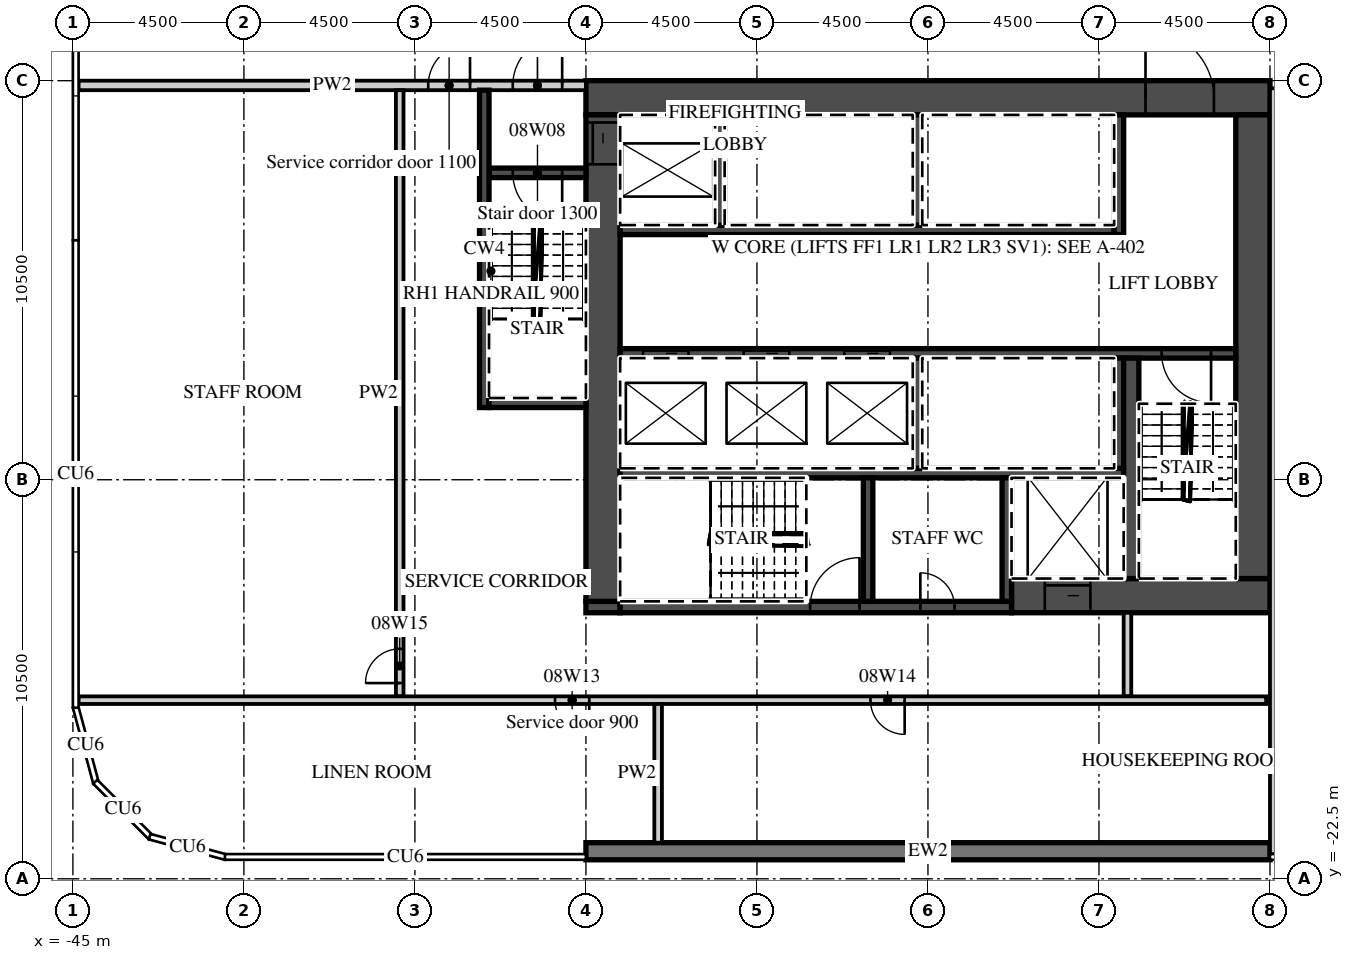
"""IFC4 building model, lengths in metres.
Left out: names, types, materials, properties, quantities, classifications, styles, units other than length and angle.
Written with IfcOpenShell. Run it as: python <this file> out.ifc"""

import sys

from ifc_helpers import new_model, si_unit, direction, frame, frame_2d, origin, place, context, subcontext, project, spatial, rectangle, extrude, element, fill, save


model = new_model("IFC4")
c1 = context("Model", 3, precision=1e-05, world=origin(), true_north=direction((0.0, 1.0)))
c2 = subcontext(c1, "Body", "Model", "MODEL_VIEW")
j1 = project(units=[si_unit("LENGTHUNIT", "METRE"), si_unit("PLANEANGLEUNIT", "RADIAN")], contexts=[c1])
p1 = place(None, origin())
s1 = spatial("IfcSite", under=j1, at=p1, CompositionType="ELEMENT")
p2 = place(p1, origin())
s2 = spatial("IfcBuilding", under=s1, at=p2, CompositionType="ELEMENT")
p3 = place(p2, frame((0.0, 0.0, 53.0)))
s3 = spatial("IfcBuildingStorey", under=s2, at=p3, CompositionType="ELEMENT", Elevation=53.0)
p4 = place(p3, frame((-31.5, -21.775, 0.0), z_axis=(0.0, 0.0, 1.0), x_axis=(1.0, 0.0, 0.0)))
e1 = element("IfcWall", 1, at=p4, inside=s3, PredefinedType="SOLIDWALL", context=c2, shape_type="SweptSolid", body=[
    extrude(rectangle(XDim=18.0, YDim=0.45, at=frame_2d((9.0, 0.0))), origin(), (0.0, 0.0, 1.0), 6.72),
])
p5 = place(p3, frame((-31.5, -1.95, 0.0), z_axis=(0.0, 0.0, 1.0), x_axis=(1.0, 0.0, 0.0)))
e2 = element("IfcWall", 2, at=p5, inside=s3, PredefinedType="SHEAR", context=c2, shape_type="SweptSolid", body=[
    extrude(rectangle(XDim=18.0, YDim=0.9, at=frame_2d((9.0, 0.0))), origin(), (0.0, 0.0, 1.0), 6.72),
])
p6 = place(p5, frame((14.725, 0.0, 0.0)))
e3 = element("IfcOpeningElement", 3, at=p6, cuts=e2, PredefinedType="OPENING", context=c2, shape_type="SweptSolid", body=[
    extrude(rectangle(XDim=1.8, YDim=2.1, at=frame_2d((0.9, 1.05))), frame((0.0, 0.46, 0.0), z_axis=(0.0, -1.0, 0.0), x_axis=(1.0, 0.0, 0.0)), (0.0, 0.0, 1.0), 0.92),
])
p7 = place(p3, frame((-20.3, -15.05, 0.0), z_axis=(0.0, 0.0, 1.0), x_axis=(1.0, 0.0, 0.0)))
e4 = element("IfcWall", 4, at=p7, inside=s3, PredefinedType="SHEAR", context=c2, shape_type="SweptSolid", body=[
    extrude(rectangle(XDim=6.8, YDim=0.9, at=frame_2d((3.4, 0.0))), origin(), (0.0, 0.0, 1.0), 6.72),
])
p8 = place(p7, frame((0.875, 0.0, 0.0)))
e5 = element("IfcOpeningElement", 5, at=p8, cuts=e4, PredefinedType="OPENING", context=c2, shape_type="SweptSolid", body=[
    extrude(rectangle(XDim=1.2, YDim=2.1, at=frame_2d((0.6, 1.05))), frame((0.0, 0.46, 0.0), z_axis=(0.0, -1.0, 0.0), x_axis=(1.0, 0.0, 0.0)), (0.0, 0.0, 1.0), 0.92),
])
p9 = place(p3, frame((-31.5, -15.35, 0.0), z_axis=(0.0, 0.0, 1.0), x_axis=(1.0, 0.0, 0.0)))
e6 = element("IfcWall", 6, at=p9, inside=s3, PredefinedType="SHEAR", context=c2, shape_type="SweptSolid", body=[
    extrude(rectangle(XDim=0.9, YDim=0.3, at=frame_2d((0.45, 0.0))), origin(), (0.0, 0.0, 1.0), 6.72),
])
p10 = place(p3, frame((-30.6, -15.35, 0.0), z_axis=(0.0, 0.0, 1.0), x_axis=(1.0, 0.0, 0.0)))
e7 = element("IfcWall", 7, at=p10, inside=s3, PredefinedType="SHEAR", context=c2, shape_type="SweptSolid", body=[
    extrude(rectangle(XDim=10.3, YDim=0.3, at=frame_2d((5.15, 0.0))), origin(), (0.0, 0.0, 1.0), 6.72),
])
p11 = place(p10, frame((5.0, 0.0, 0.0)))
e8 = element("IfcOpeningElement", 8, at=p11, cuts=e7, PredefinedType="OPENING", context=c2, shape_type="SweptSolid", body=[
    extrude(rectangle(XDim=1.3, YDim=2.1, at=frame_2d((0.65, 1.05))), frame((0.0, 0.16, 0.0), z_axis=(0.0, -1.0, 0.0), x_axis=(1.0, 0.0, 0.0)), (0.0, 0.0, 1.0), 0.32),
])
p12 = place(p10, frame((7.9, 0.0, 0.0)))
e9 = element("IfcOpeningElement", 9, at=p12, cuts=e7, PredefinedType="OPENING", context=c2, shape_type="SweptSolid", body=[
    extrude(rectangle(XDim=0.9, YDim=2.1, at=frame_2d((0.45, 1.05))), frame((0.0, 0.16, 0.0), z_axis=(0.0, -1.0, 0.0), x_axis=(1.0, 0.0, 0.0)), (0.0, 0.0, 1.0), 0.32),
])
p13 = place(p3, frame((-31.05, -15.2, 0.0), z_axis=(0.0, 0.0, 1.0), x_axis=(0.0, 1.0, 0.0)))
e10 = element("IfcWall", 10, at=p13, inside=s3, PredefinedType="SHEAR", context=c2, shape_type="SweptSolid", body=[
    extrude(rectangle(XDim=12.8, YDim=0.9, at=frame_2d((6.4, 0.0))), origin(), (0.0, 0.0, 1.0), 6.72),
])
p14 = place(p13, frame((11.5, 0.0, 0.0)))
e11 = element("IfcOpeningElement", 11, at=p14, cuts=e10, PredefinedType="OPENING", context=c2, shape_type="SweptSolid", body=[
    extrude(rectangle(XDim=1.1, YDim=2.1, at=frame_2d((0.55, 1.05))), frame((0.0, 0.46, 0.0), z_axis=(0.0, -1.0, 0.0), x_axis=(1.0, 0.0, 0.0)), (0.0, 0.0, 1.0), 0.92),
])
p15 = place(p3, frame((-13.95, -14.6, 0.0), z_axis=(0.0, 0.0, 1.0), x_axis=(0.0, 1.0, 0.0)))
e12 = element("IfcWall", 12, at=p15, inside=s3, PredefinedType="SHEAR", context=c2, shape_type="SweptSolid", body=[
    extrude(rectangle(XDim=12.2, YDim=0.9, at=frame_2d((6.1, 0.0))), origin(), (0.0, 0.0, 1.0), 6.72),
])
p16 = place(p3, frame((-30.6, -5.425, 0.0), z_axis=(0.0, 0.0, 1.0), x_axis=(1.0, 0.0, 0.0)))
e13 = element("IfcWall", 13, at=p16, inside=s3, PredefinedType="SHEAR", context=c2, shape_type="SweptSolid", body=[
    extrude(rectangle(XDim=13.0, YDim=0.25, at=frame_2d((6.5, 0.0))), origin(), (0.0, 0.0, 1.0), 6.72),
])
p17 = place(p3, frame((-17.475, -5.55, 0.0), z_axis=(0.0, 0.0, 1.0), x_axis=(0.0, 1.0, 0.0)))
e14 = element("IfcWall", 14, at=p17, inside=s3, PredefinedType="SHEAR", context=c2, shape_type="SweptSolid", body=[
    extrude(rectangle(XDim=3.15, YDim=0.25, at=frame_2d((1.575, 0.0))), origin(), (0.0, 0.0, 1.0), 6.72),
])
for number, where, z_axis, x_axis in (
    (15, (-27.975, -5.3, 0.0), (0.0, 0.0, 1.0), (0.0, 1.0, 0.0)),
    (16, (-22.775, -5.3, 0.0), (0.0, 0.0, 1.0), (0.0, 1.0, 0.0)),
):
    element("IfcWall", number, at=place(p3, frame(where, z_axis=z_axis, x_axis=x_axis)), inside=s3, PredefinedType="SHEAR", context=c2, shape_type="SweptSolid", body=[
        extrude(rectangle(XDim=2.9, YDim=0.25, at=frame_2d((1.45, 0.0))), origin(), (0.0, 0.0, 1.0), 6.72),
    ])
p18 = place(p3, frame((-30.6, -8.675, 0.0), z_axis=(0.0, 0.0, 1.0), x_axis=(1.0, 0.0, 0.0)))
e17 = element("IfcWall", 17, at=p18, inside=s3, PredefinedType="SHEAR", context=c2, shape_type="SweptSolid", body=[
    extrude(rectangle(XDim=16.2, YDim=0.25, at=frame_2d((8.1, 0.0))), origin(), (0.0, 0.0, 1.0), 6.72),
])
p19 = place(p18, frame((0.6, 0.0, 0.0)))
e18 = element("IfcOpeningElement", 18, at=p19, cuts=e17, PredefinedType="OPENING", context=c2, shape_type="SweptSolid", body=[
    extrude(rectangle(XDim=1.2, YDim=2.1, at=frame_2d((0.6, 1.05))), frame((0.0, 0.135, 0.0), z_axis=(0.0, -1.0, 0.0), x_axis=(1.0, 0.0, 0.0)), (0.0, 0.0, 1.0), 0.27),
])
p20 = place(p18, frame((3.25, 0.0, 0.0)))
e19 = element("IfcOpeningElement", 19, at=p20, cuts=e17, PredefinedType="OPENING", context=c2, shape_type="SweptSolid", body=[
    extrude(rectangle(XDim=1.2, YDim=2.1, at=frame_2d((0.6, 1.05))), frame((0.0, 0.135, 0.0), z_axis=(0.0, -1.0, 0.0), x_axis=(1.0, 0.0, 0.0)), (0.0, 0.0, 1.0), 0.27),
])
p21 = place(p18, frame((5.9, 0.0, 0.0)))
e20 = element("IfcOpeningElement", 20, at=p21, cuts=e17, PredefinedType="OPENING", context=c2, shape_type="SweptSolid", body=[
    extrude(rectangle(XDim=1.2, YDim=2.1, at=frame_2d((0.6, 1.05))), frame((0.0, 0.135, 0.0), z_axis=(0.0, -1.0, 0.0), x_axis=(1.0, 0.0, 0.0)), (0.0, 0.0, 1.0), 0.27),
])
p22 = place(p18, frame((14.25, 0.0, 0.0)))
e21 = element("IfcOpeningElement", 21, at=p22, cuts=e17, PredefinedType="OPENING", context=c2, shape_type="SweptSolid", body=[
    extrude(rectangle(XDim=1.3, YDim=2.1, at=frame_2d((0.65, 1.05))), frame((0.0, 0.135, 0.0), z_axis=(0.0, -1.0, 0.0), x_axis=(1.0, 0.0, 0.0)), (0.0, 0.0, 1.0), 0.27),
])
p23 = place(p3, frame((-30.6, -11.825, 0.0), z_axis=(0.0, 0.0, 1.0), x_axis=(1.0, 0.0, 0.0)))
e22 = element("IfcWall", 22, at=p23, inside=s3, PredefinedType="SHEAR", context=c2, shape_type="SweptSolid", body=[
    extrude(rectangle(XDim=13.25, YDim=0.25, at=frame_2d((6.625, 0.0))), origin(), (0.0, 0.0, 1.0), 6.72),
])
for number, where, z_axis, x_axis in (
    (23, (-17.475, -11.7, 0.0), (0.0, 0.0, 1.0), (0.0, 1.0, 0.0)),
    (24, (-22.775, -11.7, 0.0), (0.0, 0.0, 1.0), (0.0, 1.0, 0.0)),
):
    element("IfcWall", number, at=place(p3, frame(where, z_axis=z_axis, x_axis=x_axis)), inside=s3, PredefinedType="SHEAR", context=c2, shape_type="SweptSolid", body=[
        extrude(rectangle(XDim=2.9, YDim=0.25, at=frame_2d((1.45, 0.0))), origin(), (0.0, 0.0, 1.0), 6.72),
    ])
p24 = place(p3, frame((-17.15, -14.6, 0.0), z_axis=(0.0, 0.0, 1.0), x_axis=(0.0, 1.0, 0.0)))
e25 = element("IfcWall", 25, at=p24, inside=s3, PredefinedType="SHEAR", context=c2, shape_type="SweptSolid", body=[
    extrude(rectangle(XDim=5.8, YDim=0.4, at=frame_2d((2.9, 0.0))), origin(), (0.0, 0.0, 1.0), 6.72),
])
for number, where, z_axis, x_axis in (
    (26, (-20.425, -15.2, 0.0), (0.0, 0.0, 1.0), (0.0, 1.0, 0.0)),
    (27, (-24.075, -15.2, 0.0), (0.0, 0.0, 1.0), (0.0, 1.0, 0.0)),
):
    element("IfcWall", number, at=place(p3, frame(where, z_axis=z_axis, x_axis=x_axis)), inside=s3, PredefinedType="SHEAR", context=c2, shape_type="SweptSolid", body=[
        extrude(rectangle(XDim=3.25, YDim=0.25, at=frame_2d((1.625, 0.0))), origin(), (0.0, 0.0, 1.0), 6.72),
    ])
p25 = place(p3, frame((-44.85, -1.625, 0.0), z_axis=(0.0, 0.0, 1.0), x_axis=(1.0, 0.0, 0.0)))
e28 = element("IfcWall", 28, at=p25, inside=s3, PredefinedType="PARTITIONING", context=c2, shape_type="SweptSolid", body=[
    extrude(rectangle(XDim=13.35, YDim=0.25, at=frame_2d((6.675, 0.0))), origin(), (0.0, 0.0, 1.0), 6.72),
])
p26 = place(p25, frame((11.425, 0.0, 0.0)))
e29 = element("IfcOpeningElement", 29, at=p26, cuts=e28, PredefinedType="OPENING", context=c2, shape_type="SweptSolid", body=[
    extrude(rectangle(XDim=1.3, YDim=2.1, at=frame_2d((0.65, 1.05))), frame((0.0, 0.135, 0.0), z_axis=(0.0, -1.0, 0.0), x_axis=(1.0, 0.0, 0.0)), (0.0, 0.0, 1.0), 0.27),
])
p27 = place(p25, frame((9.2, 0.0, 0.0)))
e30 = element("IfcOpeningElement", 30, at=p27, cuts=e28, PredefinedType="OPENING", context=c2, shape_type="SweptSolid", body=[
    extrude(rectangle(XDim=1.1, YDim=2.1, at=frame_2d((0.55, 1.05))), frame((0.0, 0.135, 0.0), z_axis=(0.0, -1.0, 0.0), x_axis=(1.0, 0.0, 0.0)), (0.0, 0.0, 1.0), 0.27),
])
p28 = place(p3, frame((-34.05, -3.925, 0.0), z_axis=(0.0, 0.0, 1.0), x_axis=(1.0, 0.0, 0.0)))
e31 = element("IfcWall", 31, at=p28, inside=s3, PredefinedType="SHEAR", context=c2, shape_type="SweptSolid", body=[
    extrude(rectangle(XDim=2.55, YDim=0.25, at=frame_2d((1.275, 0.0))), origin(), (0.0, 0.0, 1.0), 6.72),
])
p29 = place(p28, frame((0.625, 0.0, 0.0)))
e32 = element("IfcOpeningElement", 32, at=p29, cuts=e31, PredefinedType="OPENING", context=c2, shape_type="SweptSolid", body=[
    extrude(rectangle(XDim=1.3, YDim=2.1, at=frame_2d((0.65, 1.05))), frame((0.0, 0.135, 0.0), z_axis=(0.0, -1.0, 0.0), x_axis=(1.0, 0.0, 0.0)), (0.0, 0.0, 1.0), 0.27),
])
p30 = place(p3, frame((-34.175, -10.1, 0.0), z_axis=(0.0, 0.0, 1.0), x_axis=(0.0, 1.0, 0.0)))
e33 = element("IfcWall", 33, at=p30, inside=s3, PredefinedType="SHEAR", context=c2, shape_type="SweptSolid", body=[
    extrude(rectangle(XDim=8.35, YDim=0.25, at=frame_2d((4.175, 0.0))), origin(), (0.0, 0.0, 1.0), 6.72),
])
p31 = place(p3, frame((-34.05, -9.975, 0.0), z_axis=(0.0, 0.0, 1.0), x_axis=(1.0, 0.0, 0.0)))
e34 = element("IfcWall", 34, at=p31, inside=s3, PredefinedType="SHEAR", context=c2, shape_type="SweptSolid", body=[
    extrude(rectangle(XDim=2.55, YDim=0.25, at=frame_2d((1.275, 0.0))), origin(), (0.0, 0.0, 1.0), 6.72),
])
p32 = place(p3, frame((-17.25, -17.7, 0.0), z_axis=(0.0, 0.0, 1.0), x_axis=(0.0, 1.0, 0.0)))
e35 = element("IfcWall", 35, at=p32, inside=s3, PredefinedType="PARTITIONING", context=c2, shape_type="SweptSolid", body=[
    extrude(rectangle(XDim=2.2, YDim=0.2, at=frame_2d((1.1, 0.0))), origin(), (0.0, 0.0, 1.0), 6.72),
])
p33 = place(p3, frame((-36.4, -17.7, 0.0), z_axis=(0.0, 0.0, 1.0), x_axis=(0.0, 1.0, 0.0)))
e36 = element("IfcWall", 36, at=p33, inside=s3, PredefinedType="PARTITIONING", context=c2, shape_type="SweptSolid", body=[
    extrude(rectangle(XDim=15.95, YDim=0.2, at=frame_2d((7.975, 0.0))), origin(), (0.0, 0.0, 1.0), 6.72),
])
p34 = place(p33, frame((0.35, 0.0, 0.0)))
e37 = element("IfcOpeningElement", 37, at=p34, cuts=e36, PredefinedType="OPENING", context=c2, shape_type="SweptSolid", body=[
    extrude(rectangle(XDim=0.9, YDim=2.1, at=frame_2d((0.45, 1.05))), frame((0.0, 0.11, 0.0), z_axis=(0.0, -1.0, 0.0), x_axis=(1.0, 0.0, 0.0)), (0.0, 0.0, 1.0), 0.22),
])
p35 = place(p3, frame((-44.85, -17.8, 0.0), z_axis=(0.0, 0.0, 1.0), x_axis=(1.0, 0.0, 0.0)))
e38 = element("IfcWall", 38, at=p35, inside=s3, PredefinedType="PARTITIONING", context=c2, shape_type="SweptSolid", body=[
    extrude(rectangle(XDim=31.25, YDim=0.2, at=frame_2d((15.625, 0.0))), origin(), (0.0, 0.0, 1.0), 6.72),
])
p36 = place(p35, frame((12.538, 0.0, 0.0)))
e39 = element("IfcOpeningElement", 39, at=p36, cuts=e38, PredefinedType="OPENING", context=c2, shape_type="SweptSolid", body=[
    extrude(rectangle(XDim=0.9, YDim=2.1, at=frame_2d((0.45, 1.05))), frame((0.0, 0.11, 0.0), z_axis=(0.0, -1.0, 0.0), x_axis=(1.0, 0.0, 0.0)), (0.0, 0.0, 1.0), 0.22),
])
p37 = place(p35, frame((20.837, 0.0, 0.0)))
e40 = element("IfcOpeningElement", 40, at=p37, cuts=e38, PredefinedType="OPENING", context=c2, shape_type="SweptSolid", body=[
    extrude(rectangle(XDim=0.9, YDim=2.1, at=frame_2d((0.45, 1.05))), frame((0.0, 0.11, 0.0), z_axis=(0.0, -1.0, 0.0), x_axis=(1.0, 0.0, 0.0)), (0.0, 0.0, 1.0), 0.22),
])
p38 = place(p3, frame((-29.6, -21.55, 0.0), z_axis=(0.0, 0.0, 1.0), x_axis=(0.0, 1.0, 0.0)))
e41 = element("IfcWall", 41, at=p38, inside=s3, PredefinedType="PARTITIONING", context=c2, shape_type="SweptSolid", body=[
    extrude(rectangle(XDim=3.65, YDim=0.2, at=frame_2d((1.825, 0.0))), origin(), (0.0, 0.0, 1.0), 6.72),
])
p39 = place(p3, frame((-13.4, -21.85, 0.0), z_axis=(0.0, 0.0, 1.0), x_axis=(0.0, 1.0, 0.0)))
e42 = element("IfcWall", 42, at=p39, inside=s3, PredefinedType="PARTITIONING", context=c2, shape_type="SweptSolid", body=[
    extrude(rectangle(XDim=20.15, YDim=0.2, at=frame_2d((10.075, 0.0))), origin(), (0.0, 0.0, 1.0), 6.72),
])
p40 = place(p19, origin())
e43 = element("IfcDoor", 43, at=p40, inside=s3, OperationType="SLIDING_TO_LEFT", PredefinedType="DOOR", context=c2, shape_type="SweptSolid", body=[
    extrude(rectangle(XDim=1.2, YDim=2.1, at=frame_2d((0.6, 1.05))), frame((0.0, 0.025, 0.0), z_axis=(0.0, -1.0, 0.0), x_axis=(1.0, 0.0, 0.0)), (0.0, 0.0, 1.0), 0.05),
])
fill(e18, e43)
p41 = place(p20, origin())
e44 = element("IfcDoor", 44, at=p41, inside=s3, OperationType="SLIDING_TO_RIGHT", PredefinedType="DOOR", context=c2, shape_type="SweptSolid", body=[
    extrude(rectangle(XDim=1.2, YDim=2.1, at=frame_2d((0.6, 1.05))), frame((0.0, 0.025, 0.0), z_axis=(0.0, -1.0, 0.0), x_axis=(1.0, 0.0, 0.0)), (0.0, 0.0, 1.0), 0.05),
])
fill(e19, e44)
p42 = place(p21, origin())
e45 = element("IfcDoor", 45, at=p42, inside=s3, OperationType="SLIDING_TO_RIGHT", PredefinedType="DOOR", context=c2, shape_type="SweptSolid", body=[
    extrude(rectangle(XDim=1.2, YDim=2.1, at=frame_2d((0.6, 1.05))), frame((0.0, 0.025, 0.0), z_axis=(0.0, -1.0, 0.0), x_axis=(1.0, 0.0, 0.0)), (0.0, 0.0, 1.0), 0.05),
])
fill(e20, e45)
p43 = place(p8, origin())
e46 = element("IfcDoor", 46, at=p43, inside=s3, OperationType="SLIDING_TO_LEFT", PredefinedType="DOOR", context=c2, shape_type="SweptSolid", body=[
    extrude(rectangle(XDim=1.2, YDim=2.1, at=frame_2d((0.6, 1.05))), frame((0.0, 0.025, 0.0), z_axis=(0.0, -1.0, 0.0), x_axis=(1.0, 0.0, 0.0)), (0.0, 0.0, 1.0), 0.05),
])
fill(e5, e46)
p44 = place(p14, origin())
e47 = element("IfcDoor", 47, at=p44, inside=s3, OperationType="SLIDING_TO_RIGHT", PredefinedType="DOOR", context=c2, shape_type="SweptSolid", body=[
    extrude(rectangle(XDim=1.1, YDim=2.1, at=frame_2d((0.55, 1.05))), frame((0.0, 0.025, 0.0), z_axis=(0.0, -1.0, 0.0), x_axis=(1.0, 0.0, 0.0)), (0.0, 0.0, 1.0), 0.05),
])
fill(e11, e47)
p45 = place(p6, origin())
e48 = element("IfcDoor", 48, at=p45, inside=s3, OperationType="DOUBLE_DOOR_DOUBLE_SWING", PredefinedType="DOOR", context=c2, shape_type="SweptSolid", body=[
    extrude(rectangle(XDim=1.8, YDim=2.1, at=frame_2d((0.9, 1.05))), frame((0.0, 0.025, 0.0), z_axis=(0.0, -1.0, 0.0), x_axis=(1.0, 0.0, 0.0)), (0.0, 0.0, 1.0), 0.05),
])
fill(e3, e48)
p46 = place(p26, origin())
e49 = element("IfcDoor", 49, at=p46, inside=s3, OperationType="SINGLE_SWING_RIGHT", PredefinedType="DOOR", context=c2, shape_type="SweptSolid", body=[
    extrude(rectangle(XDim=1.3, YDim=2.1, at=frame_2d((0.65, 1.05))), frame((0.0, 0.025, 0.0), z_axis=(0.0, -1.0, 0.0), x_axis=(1.0, 0.0, 0.0)), (0.0, 0.0, 1.0), 0.05),
])
fill(e29, e49)
p47 = place(p29, origin())
e50 = element("IfcDoor", 50, at=p47, inside=s3, OperationType="SINGLE_SWING_RIGHT", PredefinedType="DOOR", context=c2, shape_type="SweptSolid", body=[
    extrude(rectangle(XDim=1.3, YDim=2.1, at=frame_2d((0.65, 1.05))), frame((0.0, 0.025, 0.0), z_axis=(0.0, -1.0, 0.0), x_axis=(1.0, 0.0, 0.0)), (0.0, 0.0, 1.0), 0.05),
])
fill(e32, e50)
p48 = place(p27, origin())
e51 = element("IfcDoor", 51, at=p48, inside=s3, OperationType="SINGLE_SWING_RIGHT", PredefinedType="DOOR", context=c2, shape_type="SweptSolid", body=[
    extrude(rectangle(XDim=1.1, YDim=2.1, at=frame_2d((0.55, 1.05))), frame((0.0, 0.025, 0.0), z_axis=(0.0, -1.0, 0.0), x_axis=(1.0, 0.0, 0.0)), (0.0, 0.0, 1.0), 0.05),
])
fill(e30, e51)
p49 = place(p22, origin())
e52 = element("IfcDoor", 52, at=p49, inside=s3, OperationType="SINGLE_SWING_RIGHT", PredefinedType="DOOR", context=c2, shape_type="SweptSolid", body=[
    extrude(rectangle(XDim=1.3, YDim=2.1, at=frame_2d((0.65, 1.05))), frame((0.0, 0.025, 0.0), z_axis=(0.0, -1.0, 0.0), x_axis=(1.0, 0.0, 0.0)), (0.0, 0.0, 1.0), 0.05),
])
fill(e21, e52)
p50 = place(p11, origin())
e53 = element("IfcDoor", 53, at=p50, inside=s3, OperationType="SINGLE_SWING_RIGHT", PredefinedType="DOOR", context=c2, shape_type="SweptSolid", body=[
    extrude(rectangle(XDim=1.3, YDim=2.1, at=frame_2d((0.65, 1.05))), frame((0.0, 0.025, 0.0), z_axis=(0.0, -1.0, 0.0), x_axis=(1.0, 0.0, 0.0)), (0.0, 0.0, 1.0), 0.05),
])
fill(e8, e53)
p51 = place(p12, origin())
e54 = element("IfcDoor", 54, at=p51, inside=s3, OperationType="SINGLE_SWING_LEFT", PredefinedType="DOOR", context=c2, shape_type="SweptSolid", body=[
    extrude(rectangle(XDim=0.9, YDim=2.1, at=frame_2d((0.45, 1.05))), frame((0.0, 0.025, 0.0), z_axis=(0.0, -1.0, 0.0), x_axis=(1.0, 0.0, 0.0)), (0.0, 0.0, 1.0), 0.05),
])
fill(e9, e54)
p52 = place(p36, origin())
e55 = element("IfcDoor", 55, at=p52, inside=s3, OperationType="SINGLE_SWING_RIGHT", PredefinedType="DOOR", context=c2, shape_type="SweptSolid", body=[
    extrude(rectangle(XDim=0.9, YDim=2.1, at=frame_2d((0.45, 1.05))), frame((0.0, 0.025, 0.0), z_axis=(0.0, -1.0, 0.0), x_axis=(1.0, 0.0, 0.0)), (0.0, 0.0, 1.0), 0.05),
])
fill(e39, e55)
p53 = place(p37, origin())
e56 = element("IfcDoor", 56, at=p53, inside=s3, OperationType="SINGLE_SWING_RIGHT", PredefinedType="DOOR", context=c2, shape_type="SweptSolid", body=[
    extrude(rectangle(XDim=0.9, YDim=2.1, at=frame_2d((0.45, 1.05))), frame((0.0, 0.025, 0.0), z_axis=(0.0, -1.0, 0.0), x_axis=(1.0, 0.0, 0.0)), (0.0, 0.0, 1.0), 0.05),
])
fill(e40, e56)
p54 = place(p34, origin())
e57 = element("IfcDoor", 57, at=p54, inside=s3, OperationType="SINGLE_SWING_LEFT", PredefinedType="DOOR", context=c2, shape_type="SweptSolid", body=[
    extrude(rectangle(XDim=0.9, YDim=2.1, at=frame_2d((0.45, 1.05))), frame((0.0, 0.025, 0.0), z_axis=(0.0, -1.0, 0.0), x_axis=(1.0, 0.0, 0.0)), (0.0, 0.0, 1.0), 0.05),
])
fill(e37, e57)
save(model, sys.argv[1])
